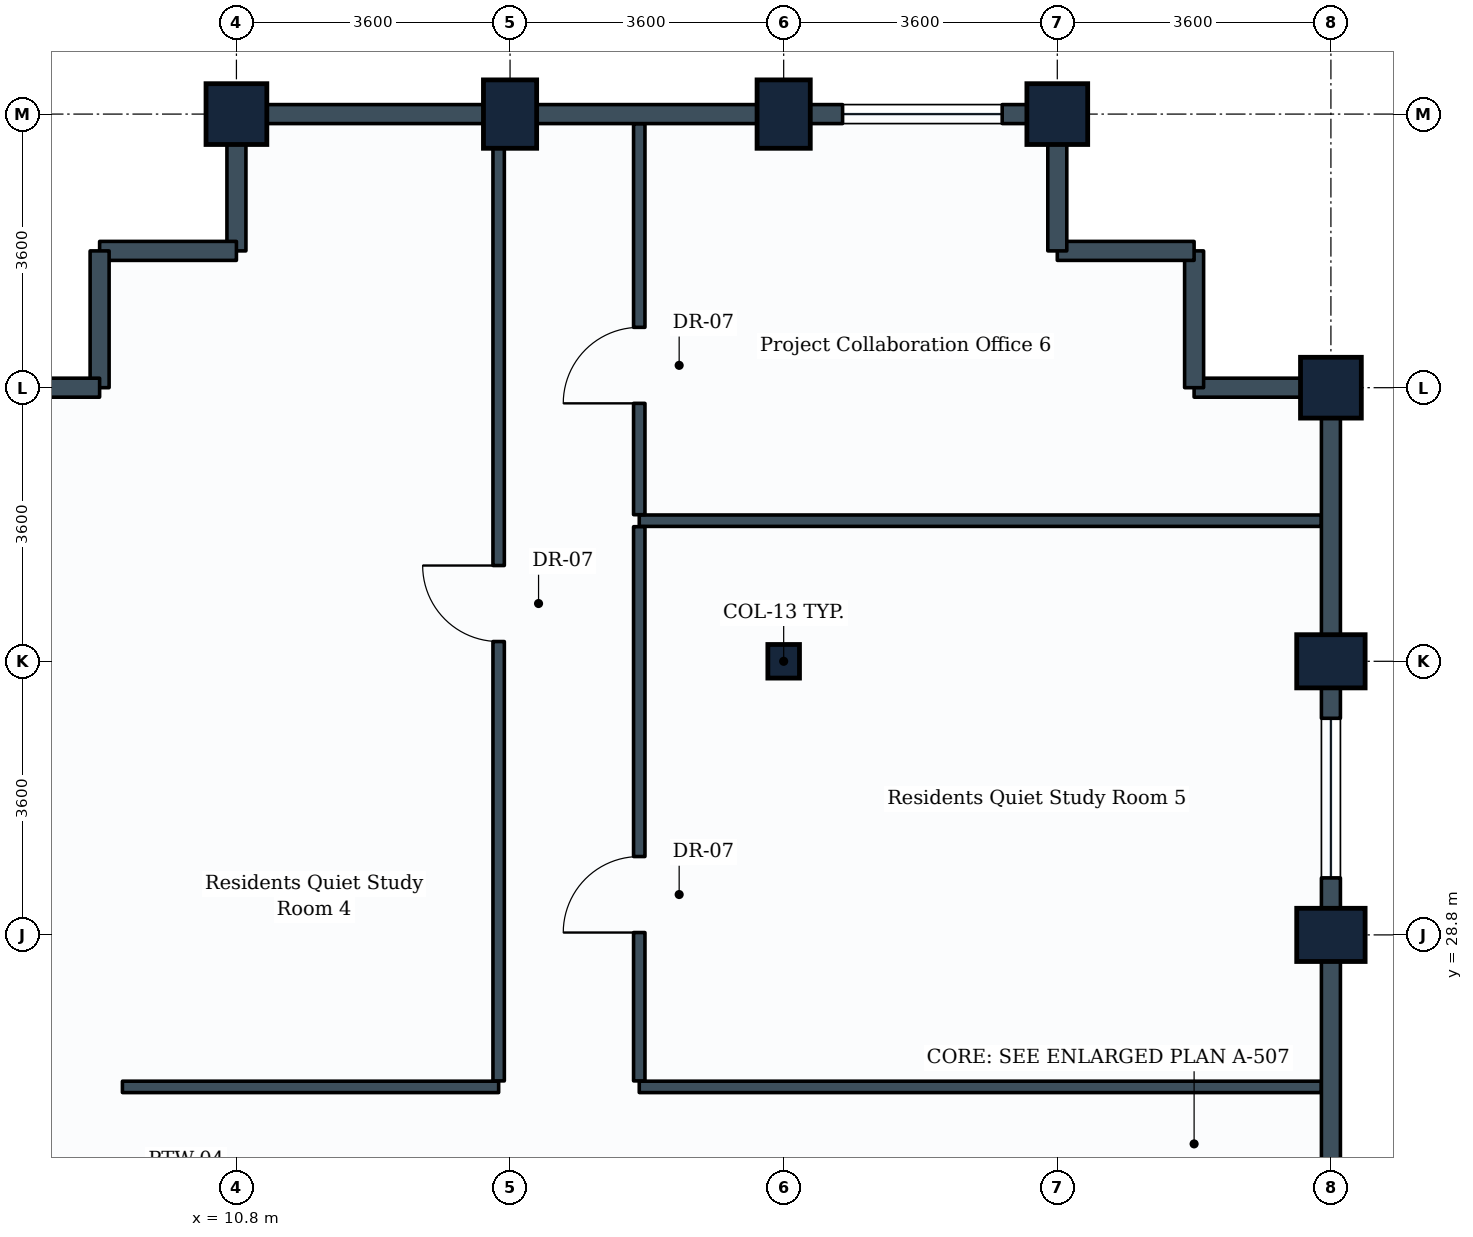
"""IFC4 building model, lengths in metres.
Left out: names, types, materials, properties, quantities, classifications, styles, units other than length and angle.
Written with IfcOpenShell. Run it as: python <this file> out.ifc"""

import sys

from ifc_helpers import new_model, si_unit, direction, frame, frame_2d, origin, origin_2d, place, context, subcontext, project, spatial, rectangle, i_section, extrude, element, fill, save


model = new_model("IFC4")
c1 = context("Model", 3, precision=1e-05, world=origin(), true_north=direction((0.0, 1.0)))
c2 = subcontext(c1, "Body", "Model", "MODEL_VIEW")
j1 = project(units=[si_unit("LENGTHUNIT", "METRE"), si_unit("PLANEANGLEUNIT", "RADIAN")], contexts=[c1])
p1 = place(None, origin())
s1 = spatial("IfcSite", under=j1, at=p1, CompositionType="ELEMENT")
p2 = place(p1, origin())
s2 = spatial("IfcBuilding", under=s1, at=p2, CompositionType="ELEMENT")
p3 = place(p2, frame((0.0, 0.0, 193.8)))
s3 = spatial("IfcBuildingStorey", under=s2, at=p3, CompositionType="ELEMENT", Elevation=193.8)
p4 = place(p3, frame((10.8, 39.6, 0.0), z_axis=(0.0, 0.0, 1.0), x_axis=(1.0, 0.0, 0.0)))
e1 = element("IfcColumn", 1, at=p4, inside=s3, PredefinedType="COLUMN", context=c2, shape_type="SweptSolid", body=[
    extrude(rectangle(XDim=0.8, YDim=0.8, at=origin_2d()), origin(), (0.0, 0.0, 1.0), 3.8),
])
p5 = place(p3, frame((14.4, 39.6, 0.0), z_axis=(0.0, 0.0, 1.0), x_axis=(1.0, 0.0, 0.0)))
e2 = element("IfcColumn", 2, at=p5, inside=s3, PredefinedType="COLUMN", context=c2, shape_type="SweptSolid", body=[
    extrude(rectangle(XDim=0.7, YDim=0.9, at=origin_2d()), origin(), (0.0, 0.0, 1.0), 3.8),
])
p6 = place(p3, frame((18.0, 32.4, 0.0), z_axis=(0.0, 0.0, 1.0), x_axis=(1.0, 0.0, 0.0)))
e3 = element("IfcColumn", 3, at=p6, inside=s3, PredefinedType="COLUMN", context=c2, shape_type="SweptSolid", body=[
    extrude(i_section(OverallWidth=0.416, OverallDepth=0.442, WebThickness=0.025, FlangeThickness=0.041, FilletRadius=0.015, at=origin_2d()), origin(), (0.0, 0.0, 1.0), 3.8),
])
p7 = place(p3, frame((18.0, 39.6, 0.0), z_axis=(0.0, 0.0, 1.0), x_axis=(1.0, 0.0, 0.0)))
e4 = element("IfcColumn", 4, at=p7, inside=s3, PredefinedType="COLUMN", context=c2, shape_type="SweptSolid", body=[
    extrude(rectangle(XDim=0.7, YDim=0.9, at=origin_2d()), origin(), (0.0, 0.0, 1.0), 3.8),
])
p8 = place(p3, frame((21.6, 39.6, 0.0), z_axis=(0.0, 0.0, 1.0), x_axis=(1.0, 0.0, 0.0)))
e5 = element("IfcColumn", 5, at=p8, inside=s3, PredefinedType="COLUMN", context=c2, shape_type="SweptSolid", body=[
    extrude(rectangle(XDim=0.8, YDim=0.8, at=origin_2d()), origin(), (0.0, 0.0, 1.0), 3.8),
])
for number, where, z_axis, x_axis in (
    (6, (25.2, 28.8, 0.0), (0.0, 0.0, 1.0), (0.0, 1.0, 0.0)),
    (7, (25.2, 32.4, 0.0), (0.0, 0.0, 1.0), (0.0, 1.0, 0.0)),
):
    element("IfcColumn", number, at=place(p3, frame(where, z_axis=z_axis, x_axis=x_axis)), inside=s3, PredefinedType="COLUMN", context=c2, shape_type="SweptSolid", body=[
        extrude(rectangle(XDim=0.7, YDim=0.9, at=origin_2d()), origin(), (0.0, 0.0, 1.0), 3.8),
    ])
p9 = place(p3, frame((25.2, 36.0, 0.0), z_axis=(0.0, 0.0, 1.0), x_axis=(0.0, 1.0, 0.0)))
e8 = element("IfcColumn", 8, at=p9, inside=s3, PredefinedType="COLUMN", context=c2, shape_type="SweptSolid", body=[
    extrude(rectangle(XDim=0.8, YDim=0.8, at=origin_2d()), origin(), (0.0, 0.0, 1.0), 3.8),
])
p10 = place(p3, frame((25.2, 25.2, 0.0), z_axis=(0.0, 0.0, 1.0), x_axis=(0.0, 1.0, 0.0)))
e9 = element("IfcWall", 9, at=p10, inside=s3, PredefinedType="STANDARD", context=c2, shape_type="SweptSolid", body=[
    extrude(rectangle(XDim=3.6, YDim=0.25, at=frame_2d((1.8, 0.0))), origin(), (0.0, 0.0, 1.0), 2.93),
])
p11 = place(p3, frame((25.2, 28.8, 0.0), z_axis=(0.0, 0.0, 1.0), x_axis=(0.0, 1.0, 0.0)))
e10 = element("IfcWall", 10, at=p11, inside=s3, PredefinedType="STANDARD", context=c2, shape_type="SweptSolid", body=[
    extrude(rectangle(XDim=3.6, YDim=0.25, at=frame_2d((1.8, 0.0))), origin(), (0.0, 0.0, 1.0), 2.93),
])
p12 = place(p11, frame((0.75, 0.0, 0.85)))
e11 = element("IfcOpeningElement", 11, at=p12, cuts=e10, PredefinedType="OPENING", context=c2, shape_type="SweptSolid", body=[
    extrude(rectangle(XDim=2.1, YDim=1.35, at=frame_2d((1.05, 0.675))), frame((0.0, 0.135, 0.0), z_axis=(0.0, -1.0, 0.0), x_axis=(1.0, 0.0, 0.0)), (0.0, 0.0, 1.0), 0.27),
])
p13 = place(p3, frame((25.2, 32.4, 0.0), z_axis=(0.0, 0.0, 1.0), x_axis=(0.0, 1.0, 0.0)))
e12 = element("IfcWall", 12, at=p13, inside=s3, PredefinedType="STANDARD", context=c2, shape_type="SweptSolid", body=[
    extrude(rectangle(XDim=3.6, YDim=0.25, at=frame_2d((1.8, 0.0))), origin(), (0.0, 0.0, 1.0), 2.93),
])
p14 = place(p3, frame((23.4, 36.0, 0.0), z_axis=(0.0, 0.0, 1.0), x_axis=(1.0, 0.0, 0.0)))
e13 = element("IfcWall", 13, at=p14, inside=s3, PredefinedType="STANDARD", context=c2, shape_type="SweptSolid", body=[
    extrude(rectangle(XDim=1.8, YDim=0.25, at=frame_2d((0.9, 0.0))), origin(), (0.0, 0.0, 1.0), 2.93),
])
p15 = place(p3, frame((23.4, 36.0, 0.0), z_axis=(0.0, 0.0, 1.0), x_axis=(0.0, 1.0, 0.0)))
e14 = element("IfcWall", 14, at=p15, inside=s3, PredefinedType="STANDARD", context=c2, shape_type="SweptSolid", body=[
    extrude(rectangle(XDim=1.8, YDim=0.25, at=frame_2d((0.9, 0.0))), origin(), (0.0, 0.0, 1.0), 3.535),
])
p16 = place(p3, frame((21.6, 37.8, 0.0), z_axis=(0.0, 0.0, 1.0), x_axis=(1.0, 0.0, 0.0)))
e15 = element("IfcWall", 15, at=p16, inside=s3, PredefinedType="STANDARD", context=c2, shape_type="SweptSolid", body=[
    extrude(rectangle(XDim=1.8, YDim=0.25, at=frame_2d((0.9, 0.0))), origin(), (0.0, 0.0, 1.0), 3.535),
])
p17 = place(p3, frame((21.6, 37.8, 0.0), z_axis=(0.0, 0.0, 1.0), x_axis=(0.0, 1.0, 0.0)))
e16 = element("IfcWall", 16, at=p17, inside=s3, PredefinedType="STANDARD", context=c2, shape_type="SweptSolid", body=[
    extrude(rectangle(XDim=1.8, YDim=0.25, at=frame_2d((0.9, 0.0))), origin(), (0.0, 0.0, 1.0), 2.93),
])
p18 = place(p3, frame((18.0, 39.6, 0.0), z_axis=(0.0, 0.0, 1.0), x_axis=(1.0, 0.0, 0.0)))
e17 = element("IfcWall", 17, at=p18, inside=s3, PredefinedType="STANDARD", context=c2, shape_type="SweptSolid", body=[
    extrude(rectangle(XDim=3.6, YDim=0.25, at=frame_2d((1.8, 0.0))), origin(), (0.0, 0.0, 1.0), 2.93),
])
p19 = place(p18, frame((0.775, 0.0, 0.85)))
e18 = element("IfcOpeningElement", 18, at=p19, cuts=e17, PredefinedType="OPENING", context=c2, shape_type="SweptSolid", body=[
    extrude(rectangle(XDim=2.1, YDim=1.35, at=frame_2d((1.05, 0.675))), frame((0.0, 0.135, 0.0), z_axis=(0.0, -1.0, 0.0), x_axis=(1.0, 0.0, 0.0)), (0.0, 0.0, 1.0), 0.27),
])
p20 = place(p3, frame((14.4, 39.6, 0.0), z_axis=(0.0, 0.0, 1.0), x_axis=(1.0, 0.0, 0.0)))
e19 = element("IfcWall", 19, at=p20, inside=s3, PredefinedType="STANDARD", context=c2, shape_type="SweptSolid", body=[
    extrude(rectangle(XDim=3.6, YDim=0.25, at=frame_2d((1.8, 0.0))), origin(), (0.0, 0.0, 1.0), 2.93),
])
p21 = place(p3, frame((10.8, 39.6, 0.0), z_axis=(0.0, 0.0, 1.0), x_axis=(1.0, 0.0, 0.0)))
e20 = element("IfcWall", 20, at=p21, inside=s3, PredefinedType="STANDARD", context=c2, shape_type="SweptSolid", body=[
    extrude(rectangle(XDim=3.6, YDim=0.25, at=frame_2d((1.8, 0.0))), origin(), (0.0, 0.0, 1.0), 2.93),
])
p22 = place(p3, frame((10.8, 37.8, 0.0), z_axis=(0.0, 0.0, 1.0), x_axis=(0.0, 1.0, 0.0)))
e21 = element("IfcWall", 21, at=p22, inside=s3, PredefinedType="STANDARD", context=c2, shape_type="SweptSolid", body=[
    extrude(rectangle(XDim=1.8, YDim=0.25, at=frame_2d((0.9, 0.0))), origin(), (0.0, 0.0, 1.0), 2.93),
])
for number, where, z_axis, x_axis in (
    (22, (9.0, 37.8, 0.0), (0.0, 0.0, 1.0), (1.0, 0.0, 0.0)),
    (23, (9.0, 36.0, 0.0), (0.0, 0.0, 1.0), (0.0, 1.0, 0.0)),
):
    element("IfcWall", number, at=place(p3, frame(where, z_axis=z_axis, x_axis=x_axis)), inside=s3, PredefinedType="STANDARD", context=c2, shape_type="SweptSolid", body=[
        extrude(rectangle(XDim=1.8, YDim=0.25, at=frame_2d((0.9, 0.0))), origin(), (0.0, 0.0, 1.0), 3.535),
    ])
p23 = place(p3, frame((7.2, 36.0, 0.0), z_axis=(0.0, 0.0, 1.0), x_axis=(1.0, 0.0, 0.0)))
e24 = element("IfcWall", 24, at=p23, inside=s3, PredefinedType="STANDARD", context=c2, shape_type="SweptSolid", body=[
    extrude(rectangle(XDim=1.8, YDim=0.25, at=frame_2d((0.9, 0.0))), origin(), (0.0, 0.0, 1.0), 2.93),
])
p24 = place(p3, frame((9.3, 26.8, 0.0), z_axis=(0.0, 0.0, 1.0), x_axis=(1.0, 0.0, 0.0)))
e25 = element("IfcWall", 25, at=p24, inside=s3, PredefinedType="PARTITIONING", context=c2, shape_type="SweptSolid", body=[
    extrude(rectangle(XDim=4.95, YDim=0.15, at=frame_2d((2.475, 0.0))), origin(), (0.0, 0.0, 1.0), 3.535),
])
p25 = place(p3, frame((14.25, 26.879, 0.0), z_axis=(0.0, 0.0, 1.0), x_axis=(0.0, 1.0, 0.0)))
e26 = element("IfcWall", 26, at=p25, inside=s3, PredefinedType="PARTITIONING", context=c2, shape_type="SweptSolid", body=[
    extrude(rectangle(XDim=12.592, YDim=0.15, at=frame_2d((6.296, 0.0))), origin(), (0.0, 0.0, 1.0), 2.93),
])
p26 = place(p25, frame((5.781, 0.0, 0.0)))
e27 = element("IfcOpeningElement", 27, at=p26, cuts=e26, PredefinedType="OPENING", context=c2, shape_type="SweptSolid", body=[
    extrude(rectangle(XDim=1.0, YDim=2.1, at=frame_2d((0.5, 1.05))), frame((0.0, 0.085, 0.0), z_axis=(0.0, -1.0, 0.0), x_axis=(1.0, 0.0, 0.0)), (0.0, 0.0, 1.0), 0.17),
])
for number, where, z_axis, x_axis in (
    (28, (16.1, 26.8, 0.0), (0.0, 0.0, 1.0), (1.0, 0.0, 0.0)),
    (29, (16.1, 34.25, 0.0), (0.0, 0.0, 1.0), (1.0, 0.0, 0.0)),
):
    element("IfcWall", number, at=place(p3, frame(where, z_axis=z_axis, x_axis=x_axis)), inside=s3, PredefinedType="PARTITIONING", context=c2, shape_type="SweptSolid", body=[
        extrude(rectangle(XDim=8.971, YDim=0.15, at=frame_2d((4.485, 0.0))), origin(), (0.0, 0.0, 1.0), 2.93),
    ])
p27 = place(p3, frame((16.1, 26.879, 0.0), z_axis=(0.0, 0.0, 1.0), x_axis=(0.0, 1.0, 0.0)))
e30 = element("IfcWall", 30, at=p27, inside=s3, PredefinedType="PARTITIONING", context=c2, shape_type="SweptSolid", body=[
    extrude(rectangle(XDim=7.292, YDim=0.15, at=frame_2d((3.646, 0.0))), origin(), (0.0, 0.0, 1.0), 3.17),
])
p28 = place(p27, frame((1.952, 0.0, 0.0)))
e31 = element("IfcOpeningElement", 31, at=p28, cuts=e30, PredefinedType="OPENING", context=c2, shape_type="SweptSolid", body=[
    extrude(rectangle(XDim=1.0, YDim=2.1, at=frame_2d((0.5, 1.05))), frame((0.0, 0.085, 0.0), z_axis=(0.0, -1.0, 0.0), x_axis=(1.0, 0.0, 0.0)), (0.0, 0.0, 1.0), 0.17),
])
p29 = place(p3, frame((16.1, 34.329, 0.0), z_axis=(0.0, 0.0, 1.0), x_axis=(0.0, 1.0, 0.0)))
e32 = element("IfcWall", 32, at=p29, inside=s3, PredefinedType="PARTITIONING", context=c2, shape_type="SweptSolid", body=[
    extrude(rectangle(XDim=5.142, YDim=0.15, at=frame_2d((2.571, 0.0))), origin(), (0.0, 0.0, 1.0), 2.93),
])
p30 = place(p29, frame((1.465, 0.0, 0.0)))
e33 = element("IfcOpeningElement", 33, at=p30, cuts=e32, PredefinedType="OPENING", context=c2, shape_type="SweptSolid", body=[
    extrude(rectangle(XDim=1.0, YDim=2.1, at=frame_2d((0.5, 1.05))), frame((0.0, 0.085, 0.0), z_axis=(0.0, -1.0, 0.0), x_axis=(1.0, 0.0, 0.0)), (0.0, 0.0, 1.0), 0.17),
])
p31 = place(p12, origin())
e34 = element("IfcWindow", 34, at=p31, inside=s3, PartitioningType="SINGLE_PANEL", PredefinedType="WINDOW", context=c2, shape_type="SweptSolid", body=[
    extrude(rectangle(XDim=2.1, YDim=1.35, at=frame_2d((1.05, 0.675))), frame((0.0, 0.03, 0.0), z_axis=(0.0, -1.0, 0.0), x_axis=(1.0, 0.0, 0.0)), (0.0, 0.0, 1.0), 0.06),
])
fill(e11, e34)
p32 = place(p19, origin())
e35 = element("IfcWindow", 35, at=p32, inside=s3, PartitioningType="SINGLE_PANEL", PredefinedType="WINDOW", context=c2, shape_type="SweptSolid", body=[
    extrude(rectangle(XDim=2.1, YDim=1.35, at=frame_2d((1.05, 0.675))), frame((0.0, 0.03, 0.0), z_axis=(0.0, -1.0, 0.0), x_axis=(1.0, 0.0, 0.0)), (0.0, 0.0, 1.0), 0.06),
])
fill(e18, e35)
p33 = place(p26, origin())
e36 = element("IfcDoor", 36, at=p33, inside=s3, OperationType="SINGLE_SWING_RIGHT", PredefinedType="DOOR", context=c2, shape_type="SweptSolid", body=[
    extrude(rectangle(XDim=1.0, YDim=2.1, at=frame_2d((0.5, 1.05))), frame((0.0, 0.025, 0.0), z_axis=(0.0, -1.0, 0.0), x_axis=(1.0, 0.0, 0.0)), (0.0, 0.0, 1.0), 0.05),
])
fill(e27, e36)
p34 = place(p28, origin())
e37 = element("IfcDoor", 37, at=p34, inside=s3, OperationType="SINGLE_SWING_LEFT", PredefinedType="DOOR", context=c2, shape_type="SweptSolid", body=[
    extrude(rectangle(XDim=1.0, YDim=2.1, at=frame_2d((0.5, 1.05))), frame((0.0, 0.025, 0.0), z_axis=(0.0, -1.0, 0.0), x_axis=(1.0, 0.0, 0.0)), (0.0, 0.0, 1.0), 0.05),
])
fill(e31, e37)
p35 = place(p30, origin())
e38 = element("IfcDoor", 38, at=p35, inside=s3, OperationType="SINGLE_SWING_LEFT", PredefinedType="DOOR", context=c2, shape_type="SweptSolid", body=[
    extrude(rectangle(XDim=1.0, YDim=2.1, at=frame_2d((0.5, 1.05))), frame((0.0, 0.025, 0.0), z_axis=(0.0, -1.0, 0.0), x_axis=(1.0, 0.0, 0.0)), (0.0, 0.0, 1.0), 0.05),
])
fill(e33, e38)
save(model, sys.argv[1])
